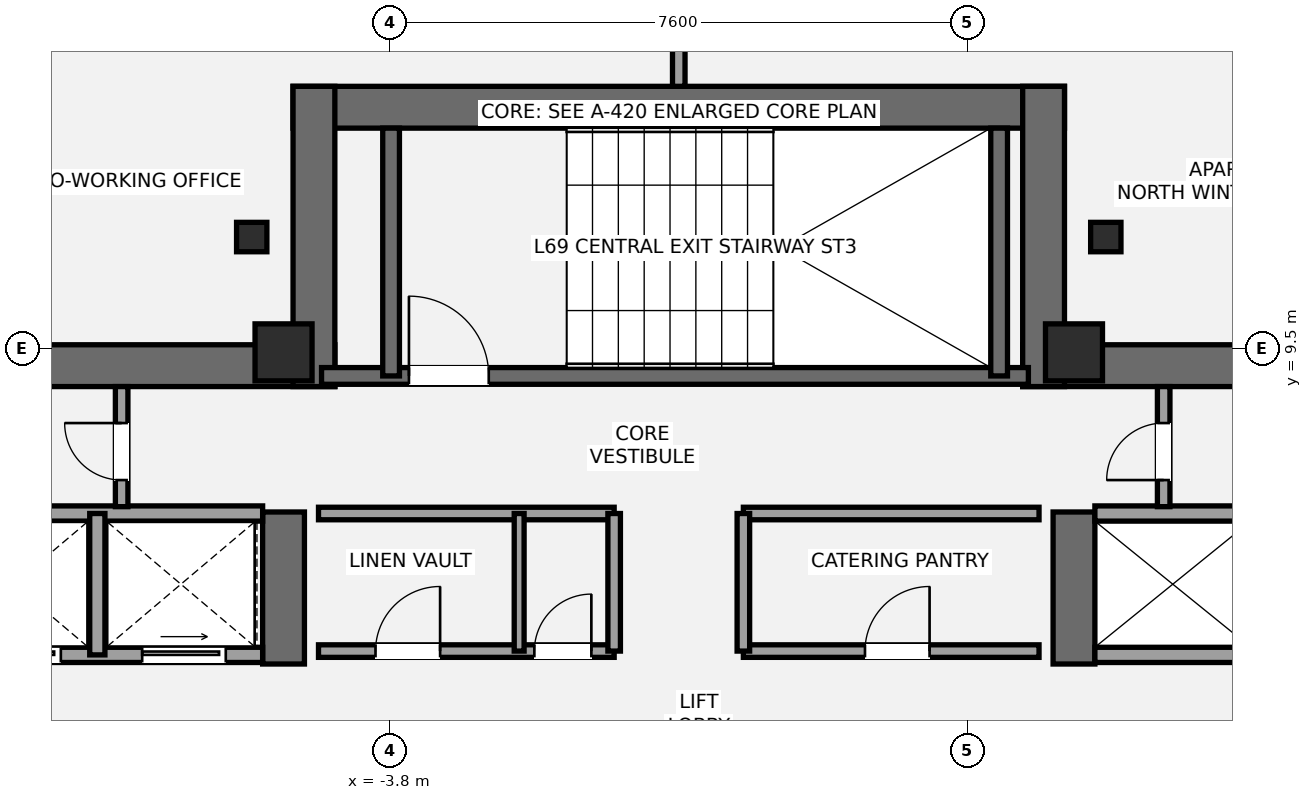
"""IFC4 building model, lengths in metres.
Left out: names, types, materials, properties, quantities, classifications, styles, units other than length and angle.
Written with IfcOpenShell. Run it as: python <this file> out.ifc"""

import sys

from ifc_helpers import new_model, si_unit, direction, frame, frame_2d, origin, origin_2d, place, context, subcontext, project, spatial, rectangle, i_section, extrude, element, fill, save


model = new_model("IFC4")
c1 = context("Model", 3, precision=1e-05, world=origin(), true_north=direction((0.0, 1.0)))
c2 = subcontext(c1, "Body", "Model", "MODEL_VIEW")
j1 = project(units=[si_unit("LENGTHUNIT", "METRE"), si_unit("PLANEANGLEUNIT", "RADIAN")], contexts=[c1])
p1 = place(None, origin())
s1 = spatial("IfcSite", under=j1, at=p1, CompositionType="ELEMENT")
p2 = place(p1, origin())
s2 = spatial("IfcBuilding", under=s1, at=p2, CompositionType="ELEMENT")
p3 = place(p2, frame((0.0, 0.0, 244.65)))
s3 = spatial("IfcBuildingStorey", under=s2, at=p3, CompositionType="ELEMENT", Elevation=244.65)
p4 = place(p3, frame((-13.7, 9.275, 0.0), z_axis=(0.0, 0.0, 1.0), x_axis=(1.0, 0.0, 0.0)))
e1 = element("IfcWall", 1, at=p4, inside=s3, PredefinedType="SHEAR", context=c2, shape_type="SweptSolid", body=[
    extrude(rectangle(XDim=9.175, YDim=0.55, at=frame_2d((4.587, 0.0))), origin(), (0.0, 0.0, 1.0), 3.15),
])
p5 = place(p3, frame((-5.2, 5.35, 0.0), z_axis=(0.0, 0.0, 1.0), x_axis=(0.0, 1.0, 0.0)))
e2 = element("IfcWall", 2, at=p5, inside=s3, PredefinedType="SHEAR", context=c2, shape_type="SweptSolid", body=[
    extrude(rectangle(XDim=2.0, YDim=0.55, at=frame_2d((1.0, 0.0))), origin(), (0.0, 0.0, 1.0), 3.15),
])
p6 = place(p3, frame((4.525, 9.275, 0.0), z_axis=(0.0, 0.0, 1.0), x_axis=(1.0, 0.0, 0.0)))
e3 = element("IfcWall", 3, at=p6, inside=s3, PredefinedType="SHEAR", context=c2, shape_type="SweptSolid", body=[
    extrude(rectangle(XDim=9.175, YDim=0.55, at=frame_2d((4.587, 0.0))), origin(), (0.0, 0.0, 1.0), 3.15),
])
p7 = place(p3, frame((5.2, 5.35, 0.0), z_axis=(0.0, 0.0, 1.0), x_axis=(0.0, 1.0, 0.0)))
e4 = element("IfcWall", 4, at=p7, inside=s3, PredefinedType="SHEAR", context=c2, shape_type="SweptSolid", body=[
    extrude(rectangle(XDim=2.0, YDim=0.55, at=frame_2d((1.0, 0.0))), origin(), (0.0, 0.0, 1.0), 3.15),
])
p8 = place(p3, frame((-5.075, 12.675, 0.0), z_axis=(0.0, 0.0, 1.0), x_axis=(1.0, 0.0, 0.0)))
e5 = element("IfcWall", 5, at=p8, inside=s3, PredefinedType="SHEAR", context=c2, shape_type="SweptSolid", body=[
    extrude(rectangle(XDim=10.15, YDim=0.55, at=frame_2d((5.075, 0.0))), origin(), (0.0, 0.0, 1.0), 3.15),
])
for number, where, z_axis, x_axis in (
    (6, (-4.8, 9.0, 0.0), (0.0, 0.0, 1.0), (0.0, 1.0, 0.0)),
    (7, (4.8, 9.0, 0.0), (0.0, 0.0, 1.0), (0.0, 1.0, 0.0)),
):
    element("IfcWall", number, at=place(p3, frame(where, z_axis=z_axis, x_axis=x_axis)), inside=s3, PredefinedType="SHEAR", context=c2, shape_type="SweptSolid", body=[
        extrude(rectangle(XDim=3.95, YDim=0.55, at=frame_2d((1.975, 0.0))), origin(), (0.0, 0.0, 1.0), 3.15),
    ])
p9 = place(p3, frame((-4.7, 9.14, 0.0), z_axis=(0.0, 0.0, 1.0), x_axis=(1.0, 0.0, 0.0)))
e8 = element("IfcWall", 8, at=p9, inside=s3, PredefinedType="SHEAR", context=c2, shape_type="SweptSolid", body=[
    extrude(rectangle(XDim=9.3, YDim=0.22, at=frame_2d((4.65, 0.0))), origin(), (0.0, 0.0, 1.0), 3.15),
])
p10 = place(p9, frame((1.15, 0.0, 0.0)))
e9 = element("IfcOpeningElement", 9, at=p10, cuts=e8, PredefinedType="OPENING", context=c2, shape_type="SweptSolid", body=[
    extrude(rectangle(XDim=1.05, YDim=2.15, at=frame_2d((0.525, 1.075))), frame((0.0, 0.12, 0.0), z_axis=(0.0, -1.0, 0.0), x_axis=(1.0, 0.0, 0.0)), (0.0, 0.0, 1.0), 0.24),
])
for number, where, z_axis, x_axis in (
    (10, (-3.785, 9.14, 0.0), (0.0, 0.0, 1.0), (0.0, 1.0, 0.0)),
    (11, (4.215, 9.14, 0.0), (0.0, 0.0, 1.0), (0.0, 1.0, 0.0)),
):
    element("IfcWall", number, at=place(p3, frame(where, z_axis=z_axis, x_axis=x_axis)), inside=s3, PredefinedType="SHEAR", context=c2, shape_type="SweptSolid", body=[
        extrude(rectangle(XDim=3.26, YDim=0.22, at=frame_2d((1.63, 0.0))), origin(), (0.0, 0.0, 1.0), 3.15),
    ])
for number, where, z_axis, x_axis in (
    (12, (-5.2, 9.45, 0.0), (0.0, 0.0, 1.0), (1.0, 0.0, 0.0)),
    (13, (5.2, 9.45, 0.0), (0.0, 0.0, 1.0), (1.0, 0.0, 0.0)),
):
    element("IfcColumn", number, at=place(p3, frame(where, z_axis=z_axis, x_axis=x_axis)), inside=s3, PredefinedType="PILASTER", context=c2, shape_type="SweptSolid", body=[
        extrude(rectangle(XDim=0.75, YDim=0.75, at=origin_2d()), origin(), (0.0, 0.0, 1.0), 3.15),
    ])
for number, where, z_axis, x_axis in (
    (14, (5.619, 10.967, 0.0), (0.0, 0.0, 1.0), (1.0, 0.0, 0.0)),
    (15, (-5.619, 10.967, 0.0), (0.0, 0.0, 1.0), (1.0, 0.0, 0.0)),
):
    element("IfcColumn", number, at=place(p3, frame(where, z_axis=z_axis, x_axis=x_axis)), inside=s3, PredefinedType="COLUMN", context=c2, shape_type="SweptSolid", body=[
        extrude(i_section(OverallWidth=0.399, OverallDepth=0.387, WebThickness=0.021, FlangeThickness=0.033, at=origin_2d()), origin(), (0.0, 0.0, 1.0), 3.15),
    ])
p11 = place(p3, frame((6.377, 14.151, 0.0), z_axis=(0.0, 0.0, 1.0), x_axis=(0.974398936081, -0.224825962391, 0.0)))
e16 = element("IfcWall", 16, at=p11, inside=s3, PredefinedType="STANDARD", context=c2, shape_type="SweptSolid", body=[
    extrude(rectangle(XDim=4.252, YDim=0.44, at=frame_2d((2.126, 0.0))), origin(), (0.0, 0.0, 1.0), 2.336),
])
p12 = place(p11, frame((1.23, 0.0, 0.55)))
e17 = element("IfcOpeningElement", 17, at=p12, cuts=e16, PredefinedType="OPENING", context=c2, shape_type="SweptSolid", body=[
    extrude(rectangle(XDim=1.4, YDim=1.55, at=frame_2d((0.7, 0.775))), frame((0.0, 0.23, 0.0), z_axis=(0.0, -1.0, 0.0), x_axis=(1.0, 0.0, 0.0)), (0.0, 0.0, 1.0), 0.46),
])
p13 = place(p3, frame((-10.52, 13.195, 0.0), z_axis=(0.0, 0.0, 1.0), x_axis=(0.974398936081, 0.224825962391, 0.0)))
e18 = element("IfcWall", 18, at=p13, inside=s3, PredefinedType="STANDARD", context=c2, shape_type="SweptSolid", body=[
    extrude(rectangle(XDim=4.252, YDim=0.44, at=frame_2d((2.126, 0.0))), origin(), (0.0, 0.0, 1.0), 2.336),
])
p14 = place(p13, frame((0.982, 0.0, 0.55)))
e19 = element("IfcOpeningElement", 19, at=p14, cuts=e18, PredefinedType="OPENING", context=c2, shape_type="SweptSolid", body=[
    extrude(rectangle(XDim=1.75, YDim=1.55, at=frame_2d((0.875, 0.775))), frame((0.0, 0.23, 0.0), z_axis=(0.0, -1.0, 0.0), x_axis=(1.0, 0.0, 0.0)), (0.0, 0.0, 1.0), 0.46),
])
p15 = place(p3, frame((-9.78, 5.47, 0.0), z_axis=(0.0, 0.0, 1.0), x_axis=(1.0, 0.0, 0.0)))
e20 = element("IfcWall", 20, at=p15, inside=s3, PredefinedType="SOLIDWALL", context=c2, shape_type="SweptSolid", body=[
    extrude(rectangle(XDim=4.305, YDim=0.2, at=frame_2d((2.152, 0.0))), origin(), (0.0, 0.0, 1.0), 2.97),
])
p16 = place(p15, frame((0.55, 0.0, 0.0)))
e21 = element("IfcOpeningElement", 21, at=p16, cuts=e20, PredefinedType="OPENING", context=c2, shape_type="SweptSolid", body=[
    extrude(rectangle(XDim=1.1, YDim=2.2, at=frame_2d((0.55, 1.1))), frame((0.0, 0.11, 0.0), z_axis=(0.0, -1.0, 0.0), x_axis=(1.0, 0.0, 0.0)), (0.0, 0.0, 1.0), 0.22),
])
p17 = place(p15, frame((2.72, 0.0, 0.0)))
e22 = element("IfcOpeningElement", 22, at=p17, cuts=e20, PredefinedType="OPENING", context=c2, shape_type="SweptSolid", body=[
    extrude(rectangle(XDim=1.1, YDim=2.2, at=frame_2d((0.55, 1.1))), frame((0.0, 0.11, 0.0), z_axis=(0.0, -1.0, 0.0), x_axis=(1.0, 0.0, 0.0)), (0.0, 0.0, 1.0), 0.22),
])
p18 = place(p3, frame((-9.78, 7.33, 0.0), z_axis=(0.0, 0.0, 1.0), x_axis=(1.0, 0.0, 0.0)))
e23 = element("IfcWall", 23, at=p18, inside=s3, PredefinedType="SOLIDWALL", context=c2, shape_type="SweptSolid", body=[
    extrude(rectangle(XDim=4.305, YDim=0.2, at=frame_2d((2.152, 0.0))), origin(), (0.0, 0.0, 1.0), 2.97),
])
p19 = place(p3, frame((-7.65, 5.47, 0.0), z_axis=(0.0, 0.0, 1.0), x_axis=(0.0, 1.0, 0.0)))
e24 = element("IfcWall", 24, at=p19, inside=s3, PredefinedType="SOLIDWALL", context=c2, shape_type="SweptSolid", body=[
    extrude(rectangle(XDim=1.86, YDim=0.2, at=frame_2d((0.93, 0.0))), origin(), (0.0, 0.0, 1.0), 2.97),
])
for number, where, z_axis, x_axis in (
    (25, (5.475, 5.47, 0.0), (0.0, 0.0, 1.0), (1.0, 0.0, 0.0)),
    (26, (5.475, 7.33, 0.0), (0.0, 0.0, 1.0), (1.0, 0.0, 0.0)),
):
    element("IfcWall", number, at=place(p3, frame(where, z_axis=z_axis, x_axis=x_axis)), inside=s3, PredefinedType="SOLIDWALL", context=c2, shape_type="SweptSolid", body=[
        extrude(rectangle(XDim=4.305, YDim=0.2, at=frame_2d((2.152, 0.0))), origin(), (0.0, 0.0, 1.0), 2.97),
    ])
p20 = place(p3, frame((-4.74, 5.52, 0.0), z_axis=(0.0, 0.0, 1.0), x_axis=(1.0, 0.0, 0.0)))
e27 = element("IfcWall", 27, at=p20, inside=s3, PredefinedType="PARTITIONING", context=c2, shape_type="SweptSolid", body=[
    extrude(rectangle(XDim=3.89, YDim=0.165, at=frame_2d((1.945, 0.0))), origin(), (0.0, 0.0, 1.0), 2.97),
])
p21 = place(p20, frame((0.75, 0.0, 0.0)))
e28 = element("IfcOpeningElement", 28, at=p21, cuts=e27, PredefinedType="OPENING", context=c2, shape_type="SweptSolid", body=[
    extrude(rectangle(XDim=0.85, YDim=2.1, at=frame_2d((0.425, 1.05))), frame((0.0, 0.093, 0.0), z_axis=(0.0, -1.0, 0.0), x_axis=(1.0, 0.0, 0.0)), (0.0, 0.0, 1.0), 0.185),
])
p22 = place(p20, frame((2.84, 0.0, 0.0)))
e29 = element("IfcOpeningElement", 29, at=p22, cuts=e27, PredefinedType="OPENING", context=c2, shape_type="SweptSolid", body=[
    extrude(rectangle(XDim=0.75, YDim=2.1, at=frame_2d((0.375, 1.05))), frame((0.0, 0.093, 0.0), z_axis=(0.0, -1.0, 0.0), x_axis=(1.0, 0.0, 0.0)), (0.0, 0.0, 1.0), 0.185),
])
p23 = place(p3, frame((-4.74, 7.33, 0.0), z_axis=(0.0, 0.0, 1.0), x_axis=(1.0, 0.0, 0.0)))
e30 = element("IfcWall", 30, at=p23, inside=s3, PredefinedType="PARTITIONING", context=c2, shape_type="SweptSolid", body=[
    extrude(rectangle(XDim=3.89, YDim=0.165, at=frame_2d((1.945, 0.0))), origin(), (0.0, 0.0, 1.0), 2.97),
])
p24 = place(p3, frame((-0.85, 5.52, 0.0), z_axis=(0.0, 0.0, 1.0), x_axis=(0.0, 1.0, 0.0)))
e31 = element("IfcWall", 31, at=p24, inside=s3, PredefinedType="PARTITIONING", context=c2, shape_type="SweptSolid", body=[
    extrude(rectangle(XDim=1.81, YDim=0.165, at=frame_2d((0.905, 0.0))), origin(), (0.0, 0.0, 1.0), 2.97),
])
p25 = place(p3, frame((0.85, 5.52, 0.0), z_axis=(0.0, 0.0, 1.0), x_axis=(1.0, 0.0, 0.0)))
e32 = element("IfcWall", 32, at=p25, inside=s3, PredefinedType="PARTITIONING", context=c2, shape_type="SweptSolid", body=[
    extrude(rectangle(XDim=3.89, YDim=0.165, at=frame_2d((1.945, 0.0))), origin(), (0.0, 0.0, 1.0), 2.97),
])
p26 = place(p25, frame((1.6, 0.0, 0.0)))
e33 = element("IfcOpeningElement", 33, at=p26, cuts=e32, PredefinedType="OPENING", context=c2, shape_type="SweptSolid", body=[
    extrude(rectangle(XDim=0.85, YDim=2.1, at=frame_2d((0.425, 1.05))), frame((0.0, 0.093, 0.0), z_axis=(0.0, -1.0, 0.0), x_axis=(1.0, 0.0, 0.0)), (0.0, 0.0, 1.0), 0.185),
])
p27 = place(p3, frame((0.85, 7.33, 0.0), z_axis=(0.0, 0.0, 1.0), x_axis=(1.0, 0.0, 0.0)))
e34 = element("IfcWall", 34, at=p27, inside=s3, PredefinedType="PARTITIONING", context=c2, shape_type="SweptSolid", body=[
    extrude(rectangle(XDim=3.89, YDim=0.165, at=frame_2d((1.945, 0.0))), origin(), (0.0, 0.0, 1.0), 2.97),
])
p28 = place(p3, frame((0.85, 5.52, 0.0), z_axis=(0.0, 0.0, 1.0), x_axis=(0.0, 1.0, 0.0)))
e35 = element("IfcWall", 35, at=p28, inside=s3, PredefinedType="PARTITIONING", context=c2, shape_type="SweptSolid", body=[
    extrude(rectangle(XDim=1.81, YDim=0.165, at=frame_2d((0.905, 0.0))), origin(), (0.0, 0.0, 1.0), 2.97),
])
p29 = place(p3, frame((-2.1, 5.52, 0.0), z_axis=(0.0, 0.0, 1.0), x_axis=(0.0, 1.0, 0.0)))
e36 = element("IfcWall", 36, at=p29, inside=s3, PredefinedType="PARTITIONING", context=c2, shape_type="SweptSolid", body=[
    extrude(rectangle(XDim=1.81, YDim=0.13, at=frame_2d((0.905, 0.0))), origin(), (0.0, 0.0, 1.0), 2.97),
])
p30 = place(p3, frame((-7.33, 7.42, 0.0), z_axis=(0.0, 0.0, 1.0), x_axis=(0.0, 1.0, 0.0)))
e37 = element("IfcWall", 37, at=p30, inside=s3, PredefinedType="PARTITIONING", context=c2, shape_type="SweptSolid", body=[
    extrude(rectangle(XDim=1.58, YDim=0.165, at=frame_2d((0.79, 0.0))), origin(), (0.0, 0.0, 1.0), 2.97),
])
p31 = place(p30, frame((0.35, 0.0, 0.0)))
e38 = element("IfcOpeningElement", 38, at=p31, cuts=e37, PredefinedType="OPENING", context=c2, shape_type="SweptSolid", body=[
    extrude(rectangle(XDim=0.75, YDim=2.1, at=frame_2d((0.375, 1.05))), frame((0.0, 0.093, 0.0), z_axis=(0.0, -1.0, 0.0), x_axis=(1.0, 0.0, 0.0)), (0.0, 0.0, 1.0), 0.185),
])
p32 = place(p3, frame((6.38, 7.42, 0.0), z_axis=(0.0, 0.0, 1.0), x_axis=(0.0, 1.0, 0.0)))
e39 = element("IfcWall", 39, at=p32, inside=s3, PredefinedType="PARTITIONING", context=c2, shape_type="SweptSolid", body=[
    extrude(rectangle(XDim=1.58, YDim=0.165, at=frame_2d((0.79, 0.0))), origin(), (0.0, 0.0, 1.0), 2.97),
])
p33 = place(p32, frame((0.35, 0.0, 0.0)))
e40 = element("IfcOpeningElement", 40, at=p33, cuts=e39, PredefinedType="OPENING", context=c2, shape_type="SweptSolid", body=[
    extrude(rectangle(XDim=0.75, YDim=2.1, at=frame_2d((0.375, 1.05))), frame((0.0, 0.093, 0.0), z_axis=(0.0, -1.0, 0.0), x_axis=(1.0, 0.0, 0.0)), (0.0, 0.0, 1.0), 0.185),
])
p34 = place(p3, frame((0.0, 12.95, 0.0), z_axis=(0.0, 0.0, 1.0), x_axis=(0.0, 1.0, 0.0)))
e41 = element("IfcWall", 41, at=p34, inside=s3, PredefinedType="PARTITIONING", context=c2, shape_type="SweptSolid", body=[
    extrude(rectangle(XDim=1.391, YDim=0.165, at=frame_2d((0.695, 0.0))), origin(), (0.0, 0.0, 1.0), 2.97),
])
p35 = place(p14, origin())
e42 = element("IfcWindow", 42, at=p35, inside=s3, PartitioningType="SINGLE_PANEL", PredefinedType="WINDOW", context=c2, shape_type="SweptSolid", body=[
    extrude(rectangle(XDim=1.75, YDim=1.55, at=frame_2d((0.875, 0.775))), frame((0.0, -0.01, 0.0), z_axis=(0.0, -1.0, 0.0), x_axis=(1.0, 0.0, 0.0)), (0.0, 0.0, 1.0), 0.06),
])
fill(e19, e42)
p36 = place(p10, origin())
e43 = element("IfcDoor", 43, at=p36, inside=s3, OperationType="SINGLE_SWING_LEFT", PredefinedType="DOOR", context=c2, shape_type="SweptSolid", body=[
    extrude(rectangle(XDim=1.05, YDim=2.15, at=frame_2d((0.525, 1.075))), frame((0.0, 0.025, 0.0), z_axis=(0.0, -1.0, 0.0), x_axis=(1.0, 0.0, 0.0)), (0.0, 0.0, 1.0), 0.05),
])
fill(e9, e43)
p37 = place(p16, origin())
e44 = element("IfcDoor", 44, at=p37, inside=s3, OperationType="SLIDING_TO_LEFT", PredefinedType="DOOR", context=c2, shape_type="SweptSolid", body=[
    extrude(rectangle(XDim=1.1, YDim=2.2, at=frame_2d((0.55, 1.1))), frame((0.0, 0.025, 0.0), z_axis=(0.0, -1.0, 0.0), x_axis=(1.0, 0.0, 0.0)), (0.0, 0.0, 1.0), 0.05),
])
fill(e21, e44)
p38 = place(p17, origin())
e45 = element("IfcDoor", 45, at=p38, inside=s3, OperationType="SLIDING_TO_LEFT", PredefinedType="DOOR", context=c2, shape_type="SweptSolid", body=[
    extrude(rectangle(XDim=1.1, YDim=2.2, at=frame_2d((0.55, 1.1))), frame((0.0, 0.025, 0.0), z_axis=(0.0, -1.0, 0.0), x_axis=(1.0, 0.0, 0.0)), (0.0, 0.0, 1.0), 0.05),
])
fill(e22, e45)
p39 = place(p21, origin())
e46 = element("IfcDoor", 46, at=p39, inside=s3, OperationType="SINGLE_SWING_RIGHT", PredefinedType="DOOR", context=c2, shape_type="SweptSolid", body=[
    extrude(rectangle(XDim=0.85, YDim=2.1, at=frame_2d((0.425, 1.05))), frame((0.0, 0.025, 0.0), z_axis=(0.0, -1.0, 0.0), x_axis=(1.0, 0.0, 0.0)), (0.0, 0.0, 1.0), 0.05),
])
fill(e28, e46)
p40 = place(p22, origin())
e47 = element("IfcDoor", 47, at=p40, inside=s3, OperationType="SINGLE_SWING_RIGHT", PredefinedType="DOOR", context=c2, shape_type="SweptSolid", body=[
    extrude(rectangle(XDim=0.75, YDim=2.1, at=frame_2d((0.375, 1.05))), frame((0.0, 0.025, 0.0), z_axis=(0.0, -1.0, 0.0), x_axis=(1.0, 0.0, 0.0)), (0.0, 0.0, 1.0), 0.05),
])
fill(e29, e47)
p41 = place(p26, origin())
e48 = element("IfcDoor", 48, at=p41, inside=s3, OperationType="SINGLE_SWING_RIGHT", PredefinedType="DOOR", context=c2, shape_type="SweptSolid", body=[
    extrude(rectangle(XDim=0.85, YDim=2.1, at=frame_2d((0.425, 1.05))), frame((0.0, 0.025, 0.0), z_axis=(0.0, -1.0, 0.0), x_axis=(1.0, 0.0, 0.0)), (0.0, 0.0, 1.0), 0.05),
])
fill(e33, e48)
p42 = place(p31, origin())
e49 = element("IfcDoor", 49, at=p42, inside=s3, OperationType="SINGLE_SWING_RIGHT", PredefinedType="DOOR", context=c2, shape_type="SweptSolid", body=[
    extrude(rectangle(XDim=0.75, YDim=2.1, at=frame_2d((0.375, 1.05))), frame((0.0, 0.025, 0.0), z_axis=(0.0, -1.0, 0.0), x_axis=(1.0, 0.0, 0.0)), (0.0, 0.0, 1.0), 0.05),
])
fill(e38, e49)
p43 = place(p33, origin())
e50 = element("IfcDoor", 50, at=p43, inside=s3, OperationType="SINGLE_SWING_LEFT", PredefinedType="DOOR", context=c2, shape_type="SweptSolid", body=[
    extrude(rectangle(XDim=0.75, YDim=2.1, at=frame_2d((0.375, 1.05))), frame((0.0, 0.025, 0.0), z_axis=(0.0, -1.0, 0.0), x_axis=(1.0, 0.0, 0.0)), (0.0, 0.0, 1.0), 0.05),
])
fill(e40, e50)
save(model, sys.argv[1])
